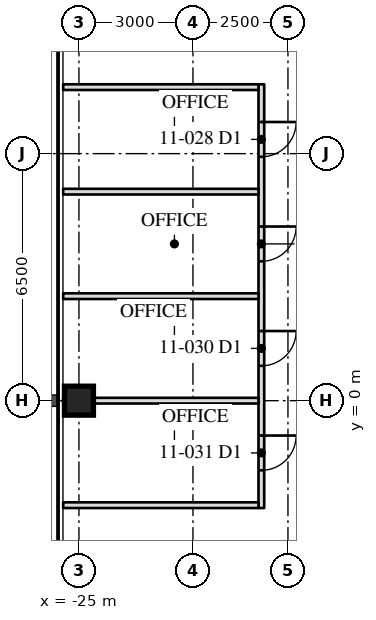
"""IFC4 building model, lengths in metres.
Left out: names, types, materials, properties, quantities, classifications, styles, units other than length and angle.
Written with IfcOpenShell. Run it as: python <this file> out.ifc"""

import sys

from ifc_helpers import new_model, si_unit, direction, frame, frame_2d, origin, origin_2d, place, context, subcontext, project, spatial, rectangle, hollow_rectangle, extrude, element, fill, save


model = new_model("IFC4")
c1 = context("Model", 3, precision=1e-05, world=origin(), true_north=direction((0.0, 1.0)))
c2 = subcontext(c1, "Body", "Model", "MODEL_VIEW")
j1 = project(units=[si_unit("LENGTHUNIT", "METRE"), si_unit("PLANEANGLEUNIT", "RADIAN")], contexts=[c1])
p1 = place(None, origin())
s1 = spatial("IfcSite", under=j1, at=p1, CompositionType="ELEMENT")
p2 = place(p1, origin())
s2 = spatial("IfcBuilding", under=s1, at=p2, CompositionType="ELEMENT")
p3 = place(p2, frame((0.0, 0.0, 48.8)))
s3 = spatial("IfcBuildingStorey", under=s2, at=p3, CompositionType="ELEMENT", Elevation=48.8)
p4 = place(p3, frame((-25.0, 0.0, 0.0), z_axis=(0.0, 0.0, 1.0), x_axis=(0.0, 1.0, 0.0)))
e1 = element("IfcColumn", 1, at=p4, inside=s3, PredefinedType="COLUMN", context=c2, shape_type="SweptSolid", body=[
    extrude(hollow_rectangle(XDim=0.762, YDim=0.762, WallThickness=0.127, at=origin_2d()), origin(), (0.0, 0.0, 1.0), 4.1),
])
p5 = place(p3, frame((-20.2, 8.325, 0.0), z_axis=(0.0, 0.0, 1.0), x_axis=(0.0, -1.0, 0.0)))
e2 = element("IfcWall", 2, at=p5, inside=s3, PredefinedType="PARTITIONING", context=c2, shape_type="SweptSolid", body=[
    extrude(rectangle(XDim=11.15, YDim=0.15, at=frame_2d((5.575, 0.0))), origin(), (0.0, 0.0, 1.0), 3.91),
])
p6 = place(p5, frame((0.992, 0.0, 0.0)))
e3 = element("IfcOpeningElement", 3, at=p6, cuts=e2, PredefinedType="OPENING", context=c2, shape_type="SweptSolid", body=[
    extrude(rectangle(XDim=0.915, YDim=2.134, at=frame_2d((0.458, 1.067))), frame((0.0, 0.085, 0.0), z_axis=(0.0, -1.0, 0.0), x_axis=(1.0, 0.0, 0.0)), (0.0, 0.0, 1.0), 0.17),
])
p7 = place(p5, frame((3.742, 0.0, 0.0)))
e4 = element("IfcOpeningElement", 4, at=p7, cuts=e2, PredefinedType="OPENING", context=c2, shape_type="SweptSolid", body=[
    extrude(rectangle(XDim=0.915, YDim=2.134, at=frame_2d((0.458, 1.067))), frame((0.0, 0.085, 0.0), z_axis=(0.0, -1.0, 0.0), x_axis=(1.0, 0.0, 0.0)), (0.0, 0.0, 1.0), 0.17),
])
p8 = place(p5, frame((6.492, 0.0, 0.0)))
e5 = element("IfcOpeningElement", 5, at=p8, cuts=e2, PredefinedType="OPENING", context=c2, shape_type="SweptSolid", body=[
    extrude(rectangle(XDim=0.915, YDim=2.134, at=frame_2d((0.458, 1.067))), frame((0.0, 0.085, 0.0), z_axis=(0.0, -1.0, 0.0), x_axis=(1.0, 0.0, 0.0)), (0.0, 0.0, 1.0), 0.17),
])
p9 = place(p5, frame((9.242, 0.0, 0.0)))
e6 = element("IfcOpeningElement", 6, at=p9, cuts=e2, PredefinedType="OPENING", context=c2, shape_type="SweptSolid", body=[
    extrude(rectangle(XDim=0.915, YDim=2.134, at=frame_2d((0.458, 1.067))), frame((0.0, 0.085, 0.0), z_axis=(0.0, -1.0, 0.0), x_axis=(1.0, 0.0, 0.0)), (0.0, 0.0, 1.0), 0.17),
])
for number, where, z_axis, x_axis in (
    (7, (-20.275, 8.25, 0.0), (0.0, 0.0, 1.0), (-1.0, 0.0, 0.0)),
    (8, (-20.275, 5.5, 0.0), (0.0, 0.0, 1.0), (-1.0, 0.0, 0.0)),
    (9, (-20.275, 2.75, 0.0), (0.0, 0.0, 1.0), (-1.0, 0.0, 0.0)),
):
    element("IfcWall", number, at=place(p3, frame(where, z_axis=z_axis, x_axis=x_axis)), inside=s3, PredefinedType="PARTITIONING", context=c2, shape_type="SweptSolid", body=[
        extrude(rectangle(XDim=5.14, YDim=0.15, at=frame_2d((2.57, 0.0))), origin(), (0.0, 0.0, 1.0), 3.91),
    ])
p10 = place(p3, frame((-20.275, 0.0, 0.0), z_axis=(0.0, 0.0, 1.0), x_axis=(-1.0, 0.0, 0.0)))
e10 = element("IfcWall", 10, at=p10, inside=s3, PredefinedType="PARTITIONING", context=c2, shape_type="SweptSolid", body=[
    extrude(rectangle(XDim=5.14, YDim=0.15, at=frame_2d((2.57, 0.0))), origin(), (0.0, 0.0, 1.0), 3.13),
])
p11 = place(p3, frame((-20.275, -2.75, 0.0), z_axis=(0.0, 0.0, 1.0), x_axis=(-1.0, 0.0, 0.0)))
e11 = element("IfcWall", 11, at=p11, inside=s3, PredefinedType="PARTITIONING", context=c2, shape_type="SweptSolid", body=[
    extrude(rectangle(XDim=5.14, YDim=0.15, at=frame_2d((2.57, 0.0))), origin(), (0.0, 0.0, 1.0), 3.91),
])
p12 = place(p6, origin())
e12 = element("IfcDoor", 12, at=p12, inside=s3, OperationType="SINGLE_SWING_LEFT", PredefinedType="DOOR", context=c2, shape_type="SweptSolid", body=[
    extrude(rectangle(XDim=0.915, YDim=2.134, at=frame_2d((0.458, 1.067))), frame((0.0, 0.025, 0.0), z_axis=(0.0, -1.0, 0.0), x_axis=(1.0, 0.0, 0.0)), (0.0, 0.0, 1.0), 0.05),
])
fill(e3, e12)
p13 = place(p7, origin())
e13 = element("IfcDoor", 13, at=p13, inside=s3, OperationType="SINGLE_SWING_LEFT", PredefinedType="DOOR", context=c2, shape_type="SweptSolid", body=[
    extrude(rectangle(XDim=0.915, YDim=2.134, at=frame_2d((0.458, 1.067))), frame((0.0, 0.025, 0.0), z_axis=(0.0, -1.0, 0.0), x_axis=(1.0, 0.0, 0.0)), (0.0, 0.0, 1.0), 0.05),
])
fill(e4, e13)
p14 = place(p8, origin())
e14 = element("IfcDoor", 14, at=p14, inside=s3, OperationType="SINGLE_SWING_LEFT", PredefinedType="DOOR", context=c2, shape_type="SweptSolid", body=[
    extrude(rectangle(XDim=0.915, YDim=2.134, at=frame_2d((0.458, 1.067))), frame((0.0, 0.025, 0.0), z_axis=(0.0, -1.0, 0.0), x_axis=(1.0, 0.0, 0.0)), (0.0, 0.0, 1.0), 0.05),
])
fill(e5, e14)
p15 = place(p9, origin())
e15 = element("IfcDoor", 15, at=p15, inside=s3, OperationType="SINGLE_SWING_LEFT", PredefinedType="DOOR", context=c2, shape_type="SweptSolid", body=[
    extrude(rectangle(XDim=0.915, YDim=2.134, at=frame_2d((0.458, 1.067))), frame((0.0, 0.025, 0.0), z_axis=(0.0, -1.0, 0.0), x_axis=(1.0, 0.0, 0.0)), (0.0, 0.0, 1.0), 0.05),
])
fill(e6, e15)
save(model, sys.argv[1])
